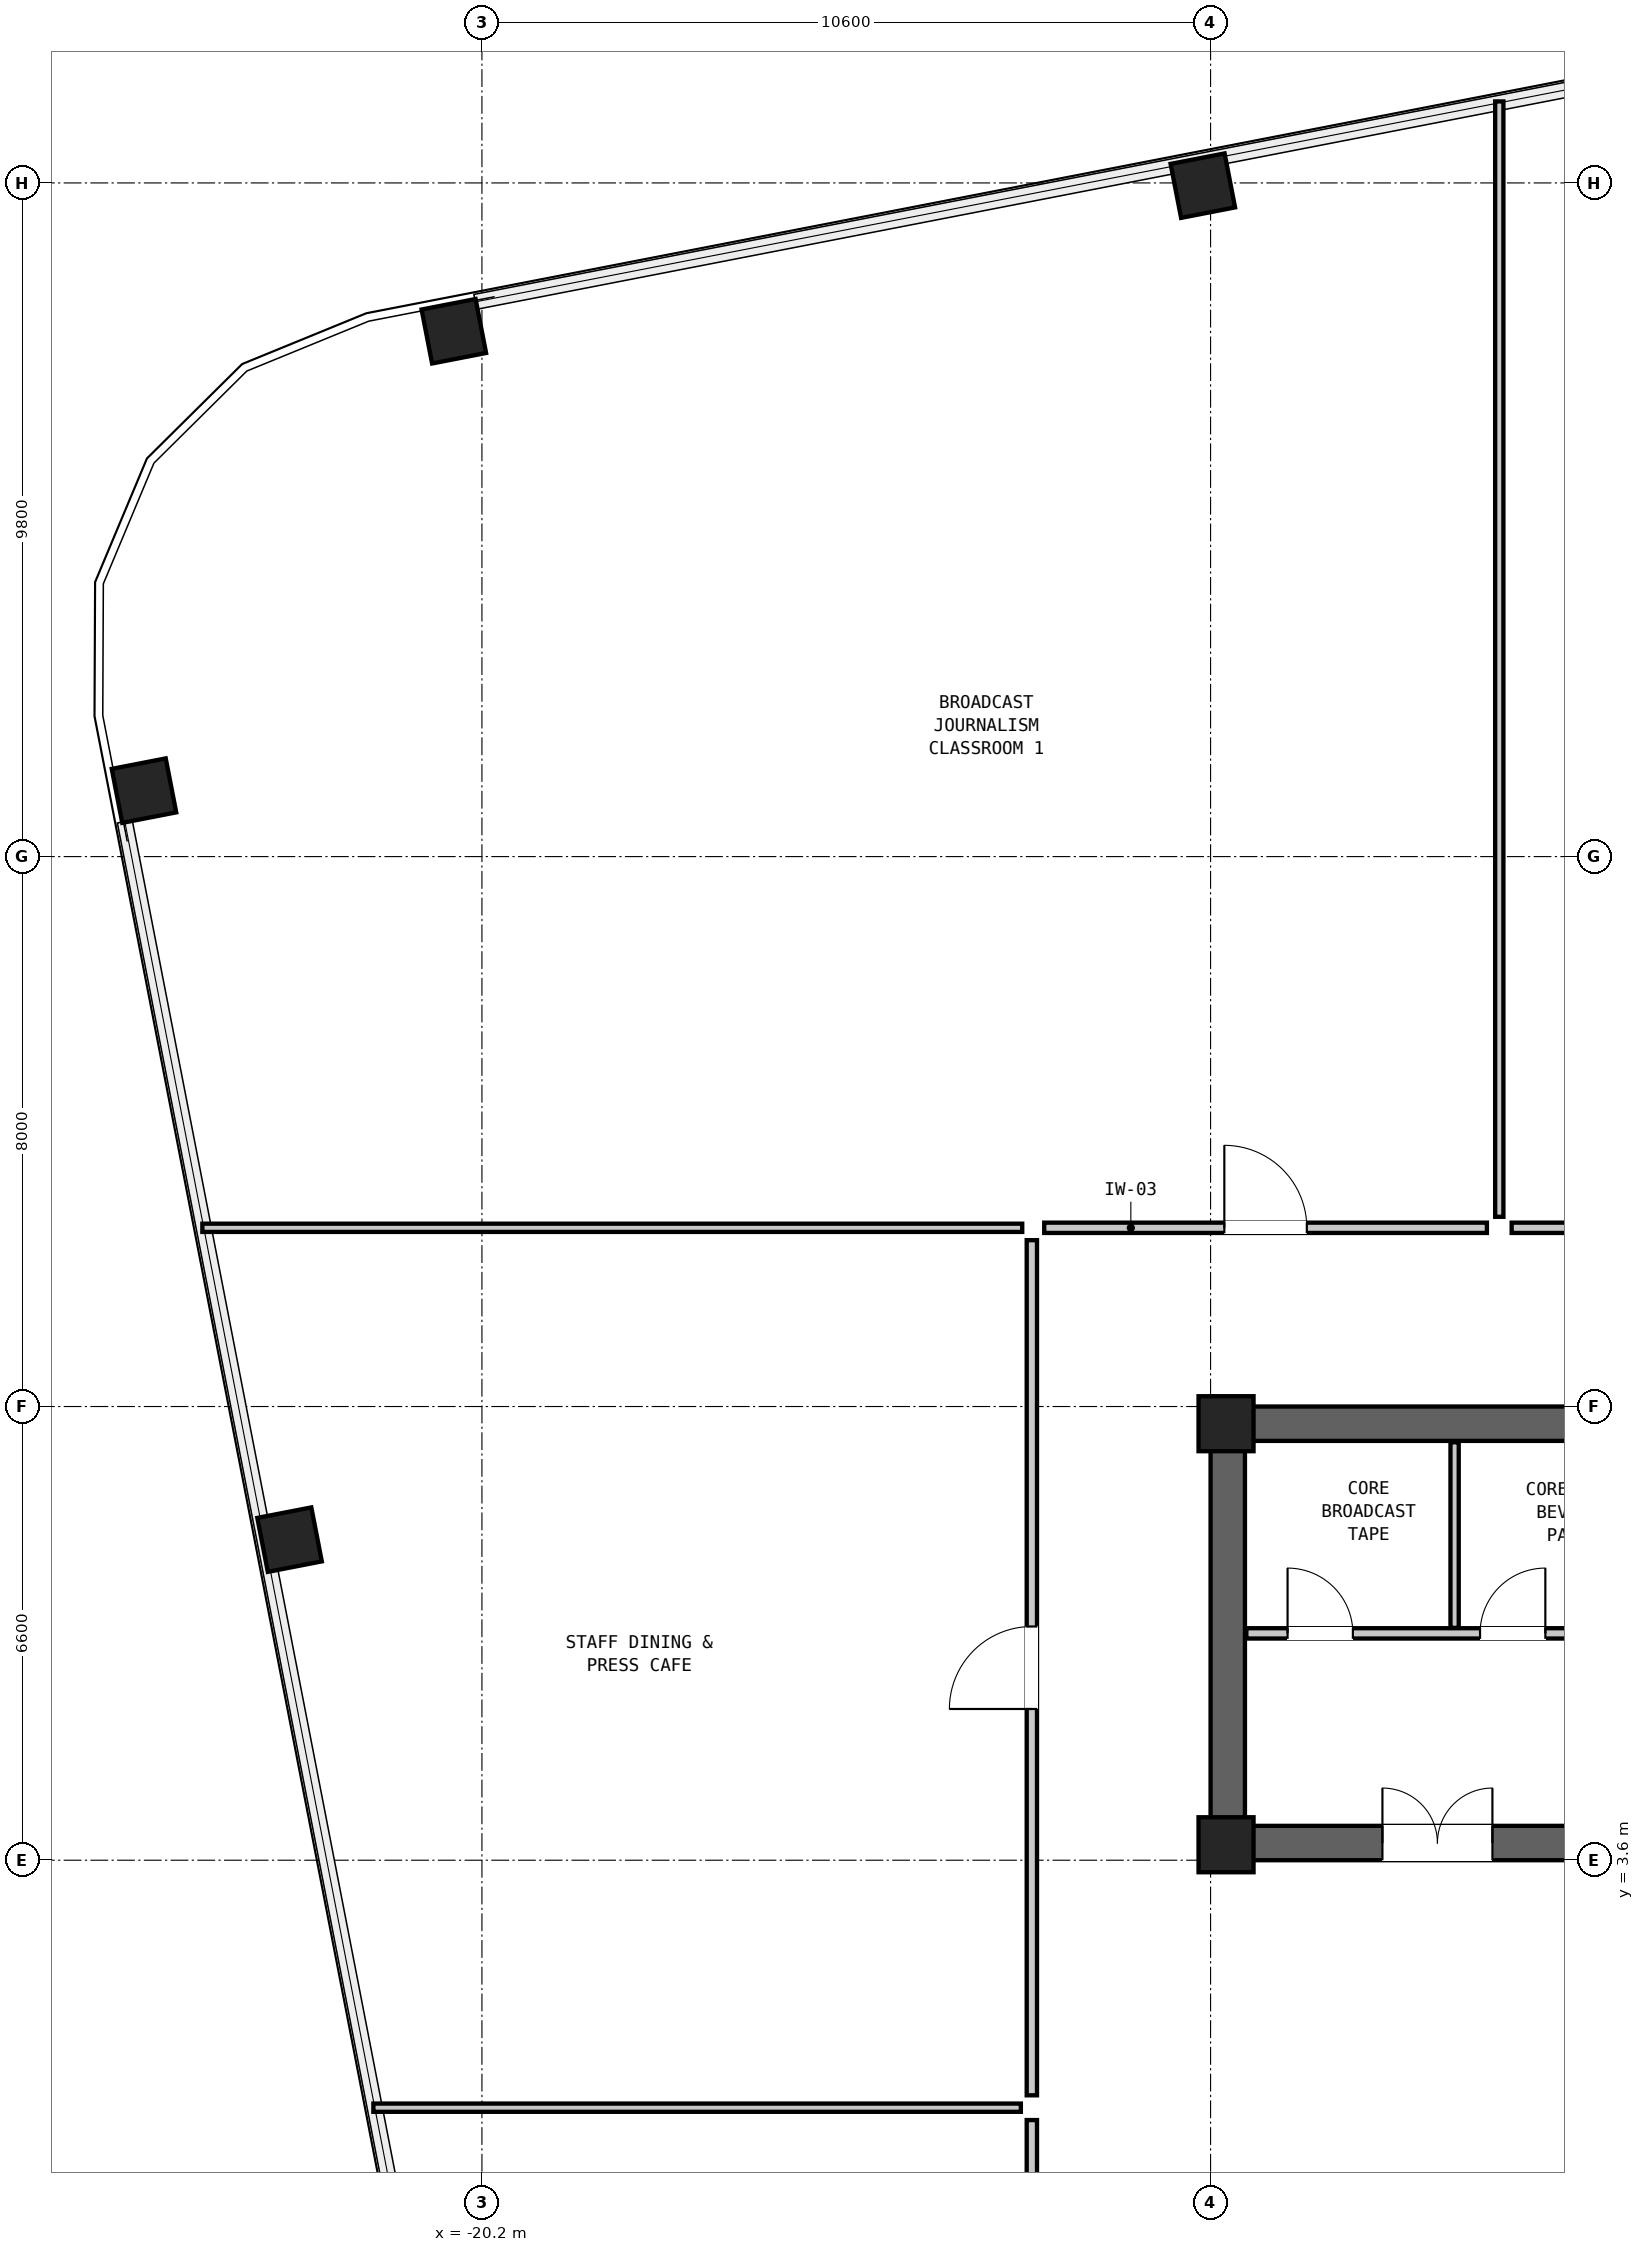
"""IFC4 building model, lengths in metres.
Left out: names, types, materials, properties, quantities, classifications, styles, units other than length and angle.
Written with IfcOpenShell. Run it as: python <this file> out.ifc"""

import sys

from ifc_helpers import new_model, si_unit, direction, frame, frame_2d, origin, origin_2d, place, context, subcontext, project, spatial, rectangle, hollow_rectangle, extrude, element, fill, save


model = new_model("IFC4")
c1 = context("Model", 3, precision=1e-05, world=origin(), true_north=direction((0.0, 1.0)))
c2 = subcontext(c1, "Body", "Model", "MODEL_VIEW")
j1 = project(units=[si_unit("LENGTHUNIT", "METRE"), si_unit("PLANEANGLEUNIT", "RADIAN")], contexts=[c1])
p1 = place(None, origin())
s1 = spatial("IfcSite", under=j1, at=p1, CompositionType="ELEMENT")
p2 = place(p1, origin())
s2 = spatial("IfcBuilding", under=s1, at=p2, CompositionType="ELEMENT")
p3 = place(p2, frame((0.0, 0.0, 140.25)))
s3 = spatial("IfcBuildingStorey", under=s2, at=p3, CompositionType="ELEMENT", Elevation=140.25)
p4 = place(p3, frame((-9.6, 9.95, 0.0), z_axis=(0.0, 0.0, 1.0), x_axis=(1.0, 0.0, 0.0)))
e1 = element("IfcWall", 1, at=p4, inside=s3, PredefinedType="SHEAR", context=c2, shape_type="SweptSolid", body=[
    extrude(rectangle(XDim=19.2, YDim=0.5, at=frame_2d((9.6, 0.0))), origin(), (0.0, 0.0, 1.0), 4.35),
])
p5 = place(p3, frame((-9.6, 3.85, 0.0), z_axis=(0.0, 0.0, 1.0), x_axis=(1.0, 0.0, 0.0)))
e2 = element("IfcWall", 2, at=p5, inside=s3, PredefinedType="SHEAR", context=c2, shape_type="SweptSolid", body=[
    extrude(rectangle(XDim=19.2, YDim=0.5, at=frame_2d((9.6, 0.0))), origin(), (0.0, 0.0, 1.0), 4.35),
])
p6 = place(p5, frame((14.2, 0.0, 0.0)))
e3 = element("IfcOpeningElement", 3, at=p6, cuts=e2, PredefinedType="OPENING", context=c2, shape_type="SweptSolid", body=[
    extrude(rectangle(XDim=1.1, YDim=2.08, at=frame_2d((0.55, 1.04))), frame((0.0, 0.262, 0.0), z_axis=(0.0, -1.0, 0.0), x_axis=(1.0, 0.0, 0.0)), (0.0, 0.0, 1.0), 0.524),
])
p7 = place(p5, frame((8.2, 0.0, 0.0)))
e4 = element("IfcOpeningElement", 4, at=p7, cuts=e2, PredefinedType="OPENING", context=c2, shape_type="SweptSolid", body=[
    extrude(rectangle(XDim=1.15, YDim=2.1, at=frame_2d((0.575, 1.05))), frame((0.0, 0.262, 0.0), z_axis=(0.0, -1.0, 0.0), x_axis=(1.0, 0.0, 0.0)), (0.0, 0.0, 1.0), 0.524),
])
p8 = place(p5, frame((2.5, 0.0, 0.0)))
e5 = element("IfcOpeningElement", 5, at=p8, cuts=e2, PredefinedType="OPENING", context=c2, shape_type="SweptSolid", body=[
    extrude(rectangle(XDim=1.6, YDim=2.12, at=frame_2d((0.8, 1.06))), frame((0.0, 0.262, 0.0), z_axis=(0.0, -1.0, 0.0), x_axis=(1.0, 0.0, 0.0)), (0.0, 0.0, 1.0), 0.524),
])
p9 = place(p3, frame((-9.35, 3.6, 0.0), z_axis=(0.0, 0.0, 1.0), x_axis=(0.0, 1.0, 0.0)))
e6 = element("IfcWall", 6, at=p9, inside=s3, PredefinedType="SHEAR", context=c2, shape_type="SweptSolid", body=[
    extrude(rectangle(XDim=6.6, YDim=0.5, at=frame_2d((3.3, 0.0))), origin(), (0.0, 0.0, 1.0), 4.35),
])
for number, where, z_axis, x_axis in (
    (7, (-9.713, 27.96, 0.0), (0.0, 0.0, 1.0), (0.982, 0.191, 0.0)),
    (8, (-20.609, 25.842, 0.0), (0.0, 0.0, 1.0), (0.982, 0.191, 0.0)),
    (9, (-25.116, 19.159, 0.0), (0.0, 0.0, 1.0), (-0.191, 0.982, 0.0)),
    (10, (-22.998, 8.263, 0.0), (0.0, 0.0, 1.0), (-0.191, 0.982, 0.0)),
):
    element("IfcColumn", number, at=place(p3, frame(where, z_axis=z_axis, x_axis=x_axis)), inside=s3, PredefinedType="COLUMN", context=c2, shape_type="SweptSolid", body=[
        extrude(hollow_rectangle(XDim=0.8, YDim=0.8, WallThickness=0.05, at=origin_2d()), origin(), (0.0, 0.0, 1.0), 4.35),
    ])
for number, where, z_axis, x_axis in (
    (11, (-9.375, 9.95, 0.0), (0.0, 0.0, 1.0), (1.0, 0.0, 0.0)),
    (12, (-9.375, 3.825, 0.0), (0.0, 0.0, 1.0), (1.0, 0.0, 0.0)),
):
    element("IfcColumn", number, at=place(p3, frame(where, z_axis=z_axis, x_axis=x_axis)), inside=s3, PredefinedType="COLUMN", context=c2, shape_type="SweptSolid", body=[
        extrude(rectangle(XDim=0.8, YDim=0.8, at=origin_2d()), origin(), (0.0, 0.0, 1.0), 4.35),
    ])
p10 = place(p3, frame((-9.08, 6.9, 0.0), z_axis=(0.0, 0.0, 1.0), x_axis=(1.0, 0.0, 0.0)))
e13 = element("IfcWall", 13, at=p10, inside=s3, PredefinedType="PARTITIONING", context=c2, shape_type="SweptSolid", body=[
    extrude(rectangle(XDim=5.96, YDim=0.15, at=frame_2d((2.98, 0.0))), origin(), (0.0, 0.0, 1.0), 4.07),
])
p11 = place(p10, frame((0.6, 0.0, 0.0)))
e14 = element("IfcOpeningElement", 14, at=p11, cuts=e13, PredefinedType="OPENING", context=c2, shape_type="SweptSolid", body=[
    extrude(rectangle(XDim=0.95, YDim=2.1, at=frame_2d((0.475, 1.05))), frame((0.0, 0.087, 0.0), z_axis=(0.0, -1.0, 0.0), x_axis=(1.0, 0.0, 0.0)), (0.0, 0.0, 1.0), 0.174),
])
p12 = place(p10, frame((3.4, 0.0, 0.0)))
e15 = element("IfcOpeningElement", 15, at=p12, cuts=e13, PredefinedType="OPENING", context=c2, shape_type="SweptSolid", body=[
    extrude(rectangle(XDim=0.95, YDim=2.1, at=frame_2d((0.475, 1.05))), frame((0.0, 0.087, 0.0), z_axis=(0.0, -1.0, 0.0), x_axis=(1.0, 0.0, 0.0)), (0.0, 0.0, 1.0), 0.174),
])
p13 = place(p3, frame((-6.05, 6.98, 0.0), z_axis=(0.0, 0.0, 1.0), x_axis=(0.0, 1.0, 0.0)))
e16 = element("IfcWall", 16, at=p13, inside=s3, PredefinedType="PARTITIONING", context=c2, shape_type="SweptSolid", body=[
    extrude(rectangle(XDim=2.7, YDim=0.12, at=frame_2d((1.35, 0.0))), origin(), (0.0, 0.0, 1.0), 4.07),
])
p14 = place(p3, frame((-24.267, 12.8, 0.0), z_axis=(0.0, 0.0, 1.0), x_axis=(1.0, 0.0, 0.0)))
e17 = element("IfcWall", 17, at=p14, inside=s3, PredefinedType="PARTITIONING", context=c2, shape_type="SweptSolid", body=[
    extrude(rectangle(XDim=11.927, YDim=0.12, at=frame_2d((5.964, 0.0))), origin(), (0.0, 0.0, 1.0), 4.07),
])
p15 = place(p3, frame((-5.4, 12.96, 0.0), z_axis=(0.0, 0.0, 1.0), x_axis=(0.0, 1.0, 0.0)))
e18 = element("IfcWall", 18, at=p15, inside=s3, PredefinedType="PARTITIONING", context=c2, shape_type="SweptSolid", body=[
    extrude(rectangle(XDim=16.226, YDim=0.12, at=frame_2d((8.113, 0.0))), origin(), (0.0, 0.0, 1.0), 2.25),
])
p16 = place(p3, frame((-21.779, 0.0, 0.0), z_axis=(0.0, 0.0, 1.0), x_axis=(1.0, 0.0, 0.0)))
e19 = element("IfcWall", 19, at=p16, inside=s3, PredefinedType="PARTITIONING", context=c2, shape_type="SweptSolid", body=[
    extrude(rectangle(XDim=9.419, YDim=0.12, at=frame_2d((4.709, 0.0))), origin(), (0.0, 0.0, 1.0), 4.07),
])
p17 = place(p3, frame((-12.02, 12.8, 0.0), z_axis=(0.0, 0.0, 1.0), x_axis=(1.0, 0.0, 0.0)))
e20 = element("IfcWall", 20, at=p17, inside=s3, PredefinedType="PARTITIONING", context=c2, shape_type="SweptSolid", body=[
    extrude(rectangle(XDim=6.44, YDim=0.15, at=frame_2d((3.22, 0.0))), origin(), (0.0, 0.0, 1.0), 4.07),
])
p18 = place(p17, frame((2.62, 0.0, 0.0)))
e21 = element("IfcOpeningElement", 21, at=p18, cuts=e20, PredefinedType="OPENING", context=c2, shape_type="SweptSolid", body=[
    extrude(rectangle(XDim=1.2, YDim=2.1, at=frame_2d((0.6, 1.05))), frame((0.0, 0.087, 0.0), z_axis=(0.0, -1.0, 0.0), x_axis=(1.0, 0.0, 0.0)), (0.0, 0.0, 1.0), 0.174),
])
p19 = place(p3, frame((-5.22, 12.8, 0.0), z_axis=(0.0, 0.0, 1.0), x_axis=(1.0, 0.0, 0.0)))
e22 = element("IfcWall", 22, at=p19, inside=s3, PredefinedType="PARTITIONING", context=c2, shape_type="SweptSolid", body=[
    extrude(rectangle(XDim=10.44, YDim=0.15, at=frame_2d((5.22, 0.0))), origin(), (0.0, 0.0, 1.0), 4.07),
])
p20 = place(p19, frame((4.62, 0.0, 0.0)))
e23 = element("IfcOpeningElement", 23, at=p20, cuts=e22, PredefinedType="OPENING", context=c2, shape_type="SweptSolid", body=[
    extrude(rectangle(XDim=1.2, YDim=2.1, at=frame_2d((0.6, 1.05))), frame((0.0, 0.087, 0.0), z_axis=(0.0, -1.0, 0.0), x_axis=(1.0, 0.0, 0.0)), (0.0, 0.0, 1.0), 0.174),
])
p21 = place(p3, frame((-12.2, -11.42, 0.0), z_axis=(0.0, 0.0, 1.0), x_axis=(0.0, 1.0, 0.0)))
e24 = element("IfcWall", 24, at=p21, inside=s3, PredefinedType="PARTITIONING", context=c2, shape_type="SweptSolid", body=[
    extrude(rectangle(XDim=11.24, YDim=0.15, at=frame_2d((5.62, 0.0))), origin(), (0.0, 0.0, 1.0), 4.07),
])
p22 = place(p21, frame((5.02, 0.0, 0.0)))
e25 = element("IfcOpeningElement", 25, at=p22, cuts=e24, PredefinedType="OPENING", context=c2, shape_type="SweptSolid", body=[
    extrude(rectangle(XDim=1.2, YDim=2.1, at=frame_2d((0.6, 1.05))), frame((0.0, 0.087, 0.0), z_axis=(0.0, -1.0, 0.0), x_axis=(1.0, 0.0, 0.0)), (0.0, 0.0, 1.0), 0.174),
])
p23 = place(p3, frame((-12.2, 0.18, 0.0), z_axis=(0.0, 0.0, 1.0), x_axis=(0.0, 1.0, 0.0)))
e26 = element("IfcWall", 26, at=p23, inside=s3, PredefinedType="PARTITIONING", context=c2, shape_type="SweptSolid", body=[
    extrude(rectangle(XDim=12.44, YDim=0.15, at=frame_2d((6.22, 0.0))), origin(), (0.0, 0.0, 1.0), 4.07),
])
p24 = place(p23, frame((5.62, 0.0, 0.0)))
e27 = element("IfcOpeningElement", 27, at=p24, cuts=e26, PredefinedType="OPENING", context=c2, shape_type="SweptSolid", body=[
    extrude(rectangle(XDim=1.2, YDim=2.1, at=frame_2d((0.6, 1.05))), frame((0.0, 0.087, 0.0), z_axis=(0.0, -1.0, 0.0), x_axis=(1.0, 0.0, 0.0)), (0.0, 0.0, 1.0), 0.174),
])
p25 = place(p8, origin())
e28 = element("IfcDoor", 28, at=p25, inside=s3, OperationType="DOUBLE_DOOR_SINGLE_SWING", PredefinedType="DOOR", context=c2, shape_type="SweptSolid", body=[
    extrude(rectangle(XDim=1.6, YDim=2.12, at=frame_2d((0.8, 1.06))), frame((0.0, 0.025, 0.0), z_axis=(0.0, -1.0, 0.0), x_axis=(1.0, 0.0, 0.0)), (0.0, 0.0, 1.0), 0.05),
])
fill(e5, e28)
p26 = place(p11, origin())
e29 = element("IfcDoor", 29, at=p26, inside=s3, OperationType="SINGLE_SWING_LEFT", PredefinedType="DOOR", context=c2, shape_type="SweptSolid", body=[
    extrude(rectangle(XDim=0.95, YDim=2.1, at=frame_2d((0.475, 1.05))), frame((0.0, 0.025, 0.0), z_axis=(0.0, -1.0, 0.0), x_axis=(1.0, 0.0, 0.0)), (0.0, 0.0, 1.0), 0.05),
])
fill(e14, e29)
p27 = place(p12, origin())
e30 = element("IfcDoor", 30, at=p27, inside=s3, OperationType="SINGLE_SWING_RIGHT", PredefinedType="DOOR", context=c2, shape_type="SweptSolid", body=[
    extrude(rectangle(XDim=0.95, YDim=2.1, at=frame_2d((0.475, 1.05))), frame((0.0, 0.025, 0.0), z_axis=(0.0, -1.0, 0.0), x_axis=(1.0, 0.0, 0.0)), (0.0, 0.0, 1.0), 0.05),
])
fill(e15, e30)
p28 = place(p18, origin())
e31 = element("IfcDoor", 31, at=p28, inside=s3, OperationType="SINGLE_SWING_LEFT", PredefinedType="DOOR", context=c2, shape_type="SweptSolid", body=[
    extrude(rectangle(XDim=1.2, YDim=2.1, at=frame_2d((0.6, 1.05))), frame((0.0, 0.025, 0.0), z_axis=(0.0, -1.0, 0.0), x_axis=(1.0, 0.0, 0.0)), (0.0, 0.0, 1.0), 0.05),
])
fill(e21, e31)
p29 = place(p24, origin())
e32 = element("IfcDoor", 32, at=p29, inside=s3, OperationType="SINGLE_SWING_LEFT", PredefinedType="DOOR", context=c2, shape_type="SweptSolid", body=[
    extrude(rectangle(XDim=1.2, YDim=2.1, at=frame_2d((0.6, 1.05))), frame((0.0, 0.025, 0.0), z_axis=(0.0, -1.0, 0.0), x_axis=(1.0, 0.0, 0.0)), (0.0, 0.0, 1.0), 0.05),
])
fill(e27, e32)
save(model, sys.argv[1])
